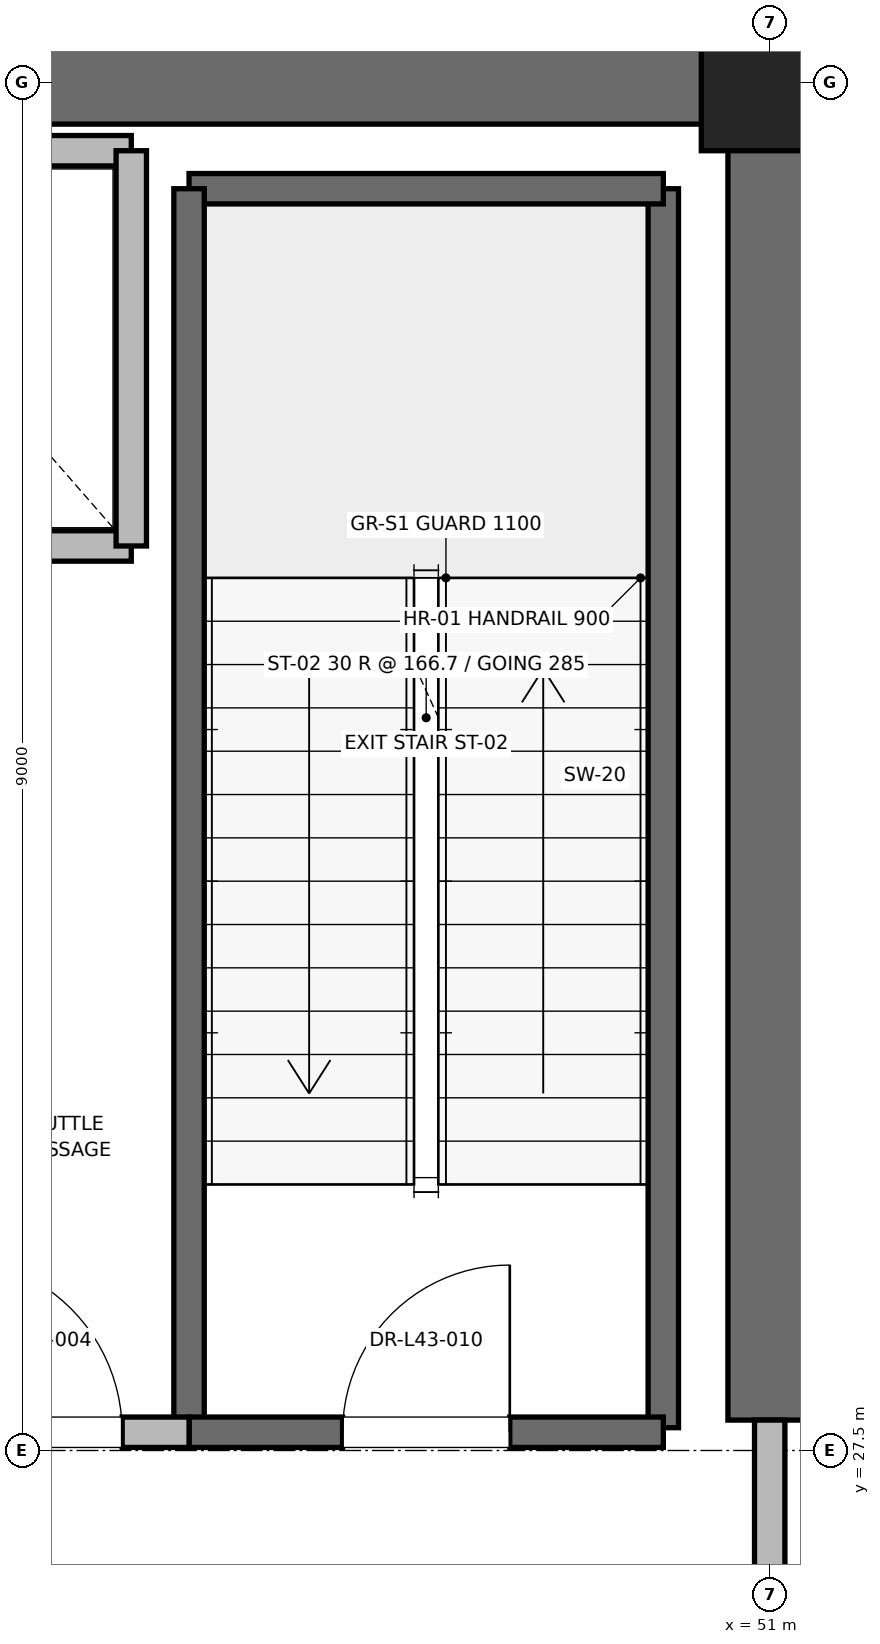
"""IFC4 building model, lengths in metres.
Left out: names, types, materials, properties, quantities, classifications, styles, units other than length and angle.
Written with IfcOpenShell. Run it as: python <this file> out.ifc"""

import sys

from ifc_helpers import new_model, si_unit, direction, frame, frame_2d, origin, origin_2d, place, context, subcontext, project, spatial, rectangle, extrude, element, fill, save


model = new_model("IFC4")
c1 = context("Model", 3, precision=1e-05, world=origin(), true_north=direction((0.0, 1.0)))
c2 = subcontext(c1, "Body", "Model", "MODEL_VIEW")
j1 = project(units=[si_unit("LENGTHUNIT", "METRE"), si_unit("PLANEANGLEUNIT", "RADIAN")], contexts=[c1])
p1 = place(None, origin())
s1 = spatial("IfcSite", under=j1, at=p1, CompositionType="ELEMENT")
p2 = place(p1, origin())
s2 = spatial("IfcBuilding", under=s1, at=p2, CompositionType="ELEMENT")
p3 = place(p2, frame((0.0, 0.0, 184.4)))
s3 = spatial("IfcBuildingStorey", under=s2, at=p3, CompositionType="ELEMENT", Elevation=184.4)
p4 = place(p3, frame((51.0, 36.5, 0.0), z_axis=(0.0, 0.0, 1.0), x_axis=(1.0, 0.0, 0.0)))
e1 = element("IfcColumn", 1, at=p4, inside=s3, PredefinedType="PILASTER", context=c2, shape_type="SweptSolid", body=[
    extrude(rectangle(XDim=0.9, YDim=0.9, at=origin_2d()), origin(), (0.0, 0.0, 1.0), 5.0),
])
p5 = place(p3, frame((45.2, 36.5, 0.0), z_axis=(0.0, 0.0, 1.0), x_axis=(1.0, 0.0, 0.0)))
e2 = element("IfcWall", 2, at=p5, inside=s3, PredefinedType="SHEAR", context=c2, shape_type="SweptSolid", body=[
    extrude(rectangle(XDim=5.8, YDim=0.55, at=frame_2d((2.9, 0.0))), origin(), (0.0, 0.0, 1.0), 4.7),
])
p6 = place(p3, frame((51.0, 27.7, 0.0), z_axis=(0.0, 0.0, 1.0), x_axis=(0.0, 1.0, 0.0)))
e3 = element("IfcWall", 3, at=p6, inside=s3, PredefinedType="SHEAR", context=c2, shape_type="SweptSolid", body=[
    extrude(rectangle(XDim=8.8, YDim=0.55, at=frame_2d((4.4, 0.0))), origin(), (0.0, 0.0, 1.0), 4.7),
])
p7 = place(p3, frame((50.3, 27.65, 0.0), z_axis=(0.0, 0.0, 1.0), x_axis=(0.0, 1.0, 0.0)))
e4 = element("IfcWall", 4, at=p7, inside=s3, PredefinedType="SOLIDWALL", context=c2, shape_type="SweptSolid", body=[
    extrude(rectangle(XDim=8.15, YDim=0.2, at=frame_2d((4.075, 0.0))), origin(), (0.0, 0.0, 1.0), 4.7),
])
p8 = place(p3, frame((47.18, 35.8, 0.0), z_axis=(0.0, 0.0, 1.0), x_axis=(1.0, 0.0, 0.0)))
e5 = element("IfcWall", 5, at=p8, inside=s3, PredefinedType="SOLIDWALL", context=c2, shape_type="SweptSolid", body=[
    extrude(rectangle(XDim=3.12, YDim=0.2, at=frame_2d((1.56, 0.0))), origin(), (0.0, 0.0, 1.0), 4.7),
])
p9 = place(p3, frame((47.18, 27.62, 0.0), z_axis=(0.0, 0.0, 1.0), x_axis=(0.0, 1.0, 0.0)))
e6 = element("IfcWall", 6, at=p9, inside=s3, PredefinedType="SOLIDWALL", context=c2, shape_type="SweptSolid", body=[
    extrude(rectangle(XDim=8.18, YDim=0.2, at=frame_2d((4.09, 0.0))), origin(), (0.0, 0.0, 1.0), 4.7),
])
p10 = place(p3, frame((47.18, 27.62, 0.0), z_axis=(0.0, 0.0, 1.0), x_axis=(1.0, 0.0, 0.0)))
e7 = element("IfcWall", 7, at=p10, inside=s3, PredefinedType="SOLIDWALL", context=c2, shape_type="SweptSolid", body=[
    extrude(rectangle(XDim=3.12, YDim=0.2, at=frame_2d((1.56, 0.0))), origin(), (0.0, 0.0, 1.0), 4.7),
])
p11 = place(p10, frame((1.01, 0.0, 0.0)))
e8 = element("IfcOpeningElement", 8, at=p11, cuts=e7, PredefinedType="OPENING", context=c2, shape_type="SweptSolid", body=[
    extrude(rectangle(XDim=1.1, YDim=2.15, at=frame_2d((0.55, 1.075))), frame((0.0, 0.1, 0.0), z_axis=(0.0, -1.0, 0.0), x_axis=(1.0, 0.0, 0.0)), (0.0, 0.0, 1.0), 0.2),
])
p12 = place(p3, frame((45.15, 27.62, 0.0), z_axis=(0.0, 0.0, 1.0), x_axis=(1.0, 0.0, 0.0)))
e9 = element("IfcWall", 9, at=p12, inside=s3, PredefinedType="PARTITIONING", context=c2, shape_type="SweptSolid", body=[
    extrude(rectangle(XDim=2.03, YDim=0.2, at=frame_2d((1.015, 0.0))), origin(), (0.0, 0.0, 1.0), 4.7),
])
p13 = place(p12, frame((0.44, 0.0, 0.0)))
e10 = element("IfcOpeningElement", 10, at=p13, cuts=e9, PredefinedType="OPENING", context=c2, shape_type="SweptSolid", body=[
    extrude(rectangle(XDim=1.15, YDim=2.2, at=frame_2d((0.575, 1.1))), frame((0.0, 0.1, 0.0), z_axis=(0.0, -1.0, 0.0), x_axis=(1.0, 0.0, 0.0)), (0.0, 0.0, 1.0), 0.2),
])
p14 = place(p3, frame((51.0, 24.3, 0.0), z_axis=(0.0, 0.0, 1.0), x_axis=(0.0, 1.0, 0.0)))
e11 = element("IfcWall", 11, at=p14, inside=s3, PredefinedType="PARTITIONING", context=c2, shape_type="SweptSolid", body=[
    extrude(rectangle(XDim=3.4, YDim=0.2, at=frame_2d((1.7, 0.0))), origin(), (0.0, 0.0, 1.0), 3.68),
])
p15 = place(p14, frame((1.125, 0.0, 0.0)))
e12 = element("IfcOpeningElement", 12, at=p15, cuts=e11, PredefinedType="OPENING", context=c2, shape_type="SweptSolid", body=[
    extrude(rectangle(XDim=1.15, YDim=2.2, at=frame_2d((0.575, 1.1))), frame((0.0, 0.1, 0.0), z_axis=(0.0, -1.0, 0.0), x_axis=(1.0, 0.0, 0.0)), (0.0, 0.0, 1.0), 0.2),
])
p16 = place(p3, frame((44.5, 33.45, 0.0), z_axis=(0.0, 0.0, 1.0), x_axis=(1.0, 0.0, 0.0)))
e13 = element("IfcWall", 13, at=p16, inside=s3, PredefinedType="SOLIDWALL", context=c2, shape_type="SweptSolid", body=[
    extrude(rectangle(XDim=2.3, YDim=0.2, at=frame_2d((1.15, 0.0))), origin(), (0.0, 0.0, 1.0), 4.7),
])
p17 = place(p3, frame((46.8, 36.05, 0.0), z_axis=(0.0, 0.0, 1.0), x_axis=(-1.0, 0.0, 0.0)))
e14 = element("IfcWall", 14, at=p17, inside=s3, PredefinedType="SOLIDWALL", context=c2, shape_type="SweptSolid", body=[
    extrude(rectangle(XDim=2.3, YDim=0.2, at=frame_2d((1.15, 0.0))), origin(), (0.0, 0.0, 1.0), 3.68),
])
p18 = place(p3, frame((46.8, 33.45, 0.0), z_axis=(0.0, 0.0, 1.0), x_axis=(0.0, 1.0, 0.0)))
e15 = element("IfcWall", 15, at=p18, inside=s3, PredefinedType="SOLIDWALL", context=c2, shape_type="SweptSolid", body=[
    extrude(rectangle(XDim=2.6, YDim=0.2, at=frame_2d((1.3, 0.0))), origin(), (0.0, 0.0, 1.0), 4.7),
])
p19 = place(p11, origin())
e16 = element("IfcDoor", 16, at=p19, inside=s3, OperationType="SINGLE_SWING_RIGHT", PredefinedType="DOOR", context=c2, shape_type="SweptSolid", body=[
    extrude(rectangle(XDim=1.1, YDim=2.15, at=frame_2d((0.55, 1.075))), frame((0.0, 0.025, 0.0), z_axis=(0.0, -1.0, 0.0), x_axis=(1.0, 0.0, 0.0)), (0.0, 0.0, 1.0), 0.05),
])
fill(e8, e16)
p20 = place(p13, origin())
e17 = element("IfcDoor", 17, at=p20, inside=s3, OperationType="SINGLE_SWING_LEFT", PredefinedType="DOOR", context=c2, shape_type="SweptSolid", body=[
    extrude(rectangle(XDim=1.15, YDim=2.2, at=frame_2d((0.575, 1.1))), frame((0.0, 0.025, 0.0), z_axis=(0.0, -1.0, 0.0), x_axis=(1.0, 0.0, 0.0)), (0.0, 0.0, 1.0), 0.05),
])
fill(e10, e17)
save(model, sys.argv[1])
